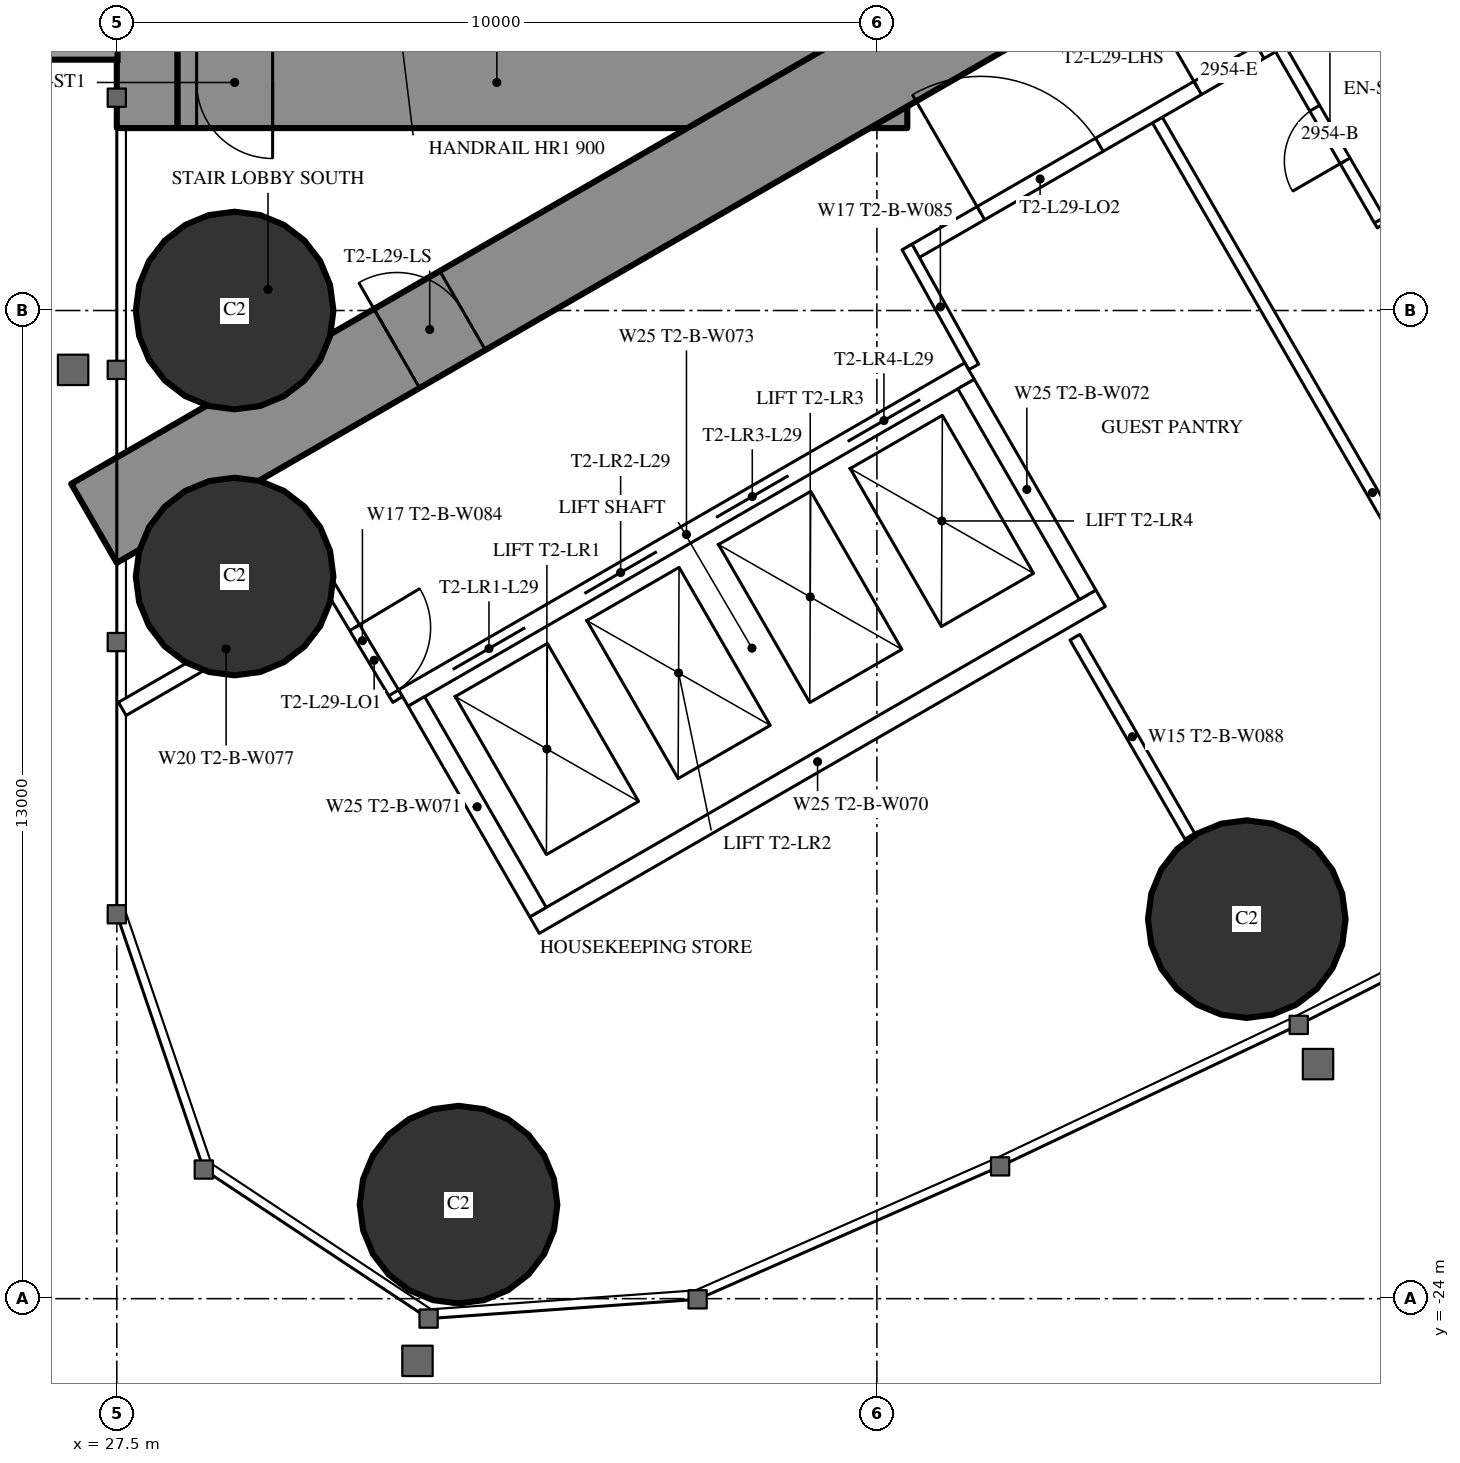
"""IFC4 building model, lengths in metres.
Left out: names, types, materials, properties, quantities, classifications, styles, units other than length and angle.
Written with IfcOpenShell. Run it as: python <this file> out.ifc"""

import sys

from ifc_helpers import new_model, si_unit, direction, frame, frame_2d, origin, origin_2d, place, context, subcontext, project, spatial, rectangle, hollow_circle, extrude, element, fill, save


model = new_model("IFC4")
c1 = context("Model", 3, precision=1e-05, world=origin(), true_north=direction((0.0, 1.0)))
c2 = subcontext(c1, "Body", "Model", "MODEL_VIEW")
j1 = project(units=[si_unit("LENGTHUNIT", "METRE"), si_unit("PLANEANGLEUNIT", "RADIAN")], contexts=[c1])
p1 = place(None, origin())
s1 = spatial("IfcSite", under=j1, at=p1, CompositionType="ELEMENT")
p2 = place(p1, origin())
s2 = spatial("IfcBuilding", under=s1, at=p2, CompositionType="ELEMENT")
p3 = place(p2, frame((0.0, 0.0, 111.6)))
s3 = spatial("IfcBuildingStorey", under=s2, at=p3, CompositionType="ELEMENT", Elevation=111.6)
for number, where, z_axis, x_axis in (
    (1, (31.996, -22.763, 0.0), (0.0, 0.0, 1.0), (1.0, 0.0, 0.0)),
    (2, (29.05, -11.0, 0.0), (0.0, 0.0, 1.0), (1.0, 0.0, 0.0)),
    (3, (29.05, -14.5, 0.0), (0.0, 0.0, 1.0), (1.0, 0.0, 0.0)),
    (4, (42.366, -19.007, 0.0), (0.0, 0.0, 1.0), (1.0, 0.0, 0.0)),
):
    element("IfcColumn", number, at=place(p3, frame(where, z_axis=z_axis, x_axis=x_axis)), inside=s3, PredefinedType="COLUMN", context=c2, shape_type="SweptSolid", body=[
        extrude(hollow_circle(Radius=1.3, WallThickness=0.1, at=origin_2d()), origin(), (0.0, 0.0, 1.0), 3.5),
    ])
p4 = place(p3, frame((27.9, -8.6, 0.0), z_axis=(0.0, 0.0, 1.0), x_axis=(0.0, 1.0, 0.0)))
e5 = element("IfcWall", 5, at=p4, inside=s3, PredefinedType="SHEAR", context=c2, shape_type="SweptSolid", body=[
    extrude(rectangle(XDim=17.2, YDim=0.8, at=frame_2d((8.6, 0.0))), origin(), (0.0, 0.0, 1.0), 3.5),
])
p5 = place(p4, frame((2.45, 0.0, 0.6)))
e6 = element("IfcOpeningElement", 6, at=p5, cuts=e5, PredefinedType="OPENING", context=c2, shape_type="SweptSolid", body=[
    extrude(rectangle(XDim=0.6, YDim=2.1, at=frame_2d((0.3, 1.05))), frame((0.0, 0.41, 0.0), z_axis=(0.0, -1.0, 0.0), x_axis=(1.0, 0.0, 0.0)), (0.0, 0.0, 1.0), 0.82),
])
p6 = place(p4, frame((14.15, 0.0, 0.6)))
e7 = element("IfcOpeningElement", 7, at=p6, cuts=e5, PredefinedType="OPENING", context=c2, shape_type="SweptSolid", body=[
    extrude(rectangle(XDim=0.6, YDim=2.1, at=frame_2d((0.3, 1.05))), frame((0.0, 0.41, 0.0), z_axis=(0.0, -1.0, 0.0), x_axis=(1.0, 0.0, 0.0)), (0.0, 0.0, 1.0), 0.82),
])
p7 = place(p3, frame((37.3, -8.6, 0.0), z_axis=(0.0, 0.0, 1.0), x_axis=(0.0, 1.0, 0.0)))
e8 = element("IfcWall", 8, at=p7, inside=s3, PredefinedType="SHEAR", context=c2, shape_type="SweptSolid", body=[
    extrude(rectangle(XDim=17.2, YDim=1.2, at=frame_2d((8.6, 0.0))), origin(), (0.0, 0.0, 1.0), 3.5),
])
p8 = place(p7, frame((7.7, 0.0, 0.0)))
e9 = element("IfcOpeningElement", 9, at=p8, cuts=e8, PredefinedType="OPENING", context=c2, shape_type="SweptSolid", body=[
    extrude(rectangle(XDim=1.8, YDim=2.2, at=frame_2d((0.9, 1.1))), frame((0.0, 0.61, 0.0), z_axis=(0.0, -1.0, 0.0), x_axis=(1.0, 0.0, 0.0)), (0.0, 0.0, 1.0), 1.22),
])
p9 = place(p3, frame((28.3, -8.0, 0.0), z_axis=(0.0, 0.0, 1.0), x_axis=(1.0, 0.0, 0.0)))
e10 = element("IfcWall", 10, at=p9, inside=s3, PredefinedType="SHEAR", context=c2, shape_type="SweptSolid", body=[
    extrude(rectangle(XDim=8.4, YDim=1.2, at=frame_2d((4.2, 0.0))), origin(), (0.0, 0.0, 1.0), 3.5),
])
p10 = place(p9, frame((0.25, 0.0, 0.0)))
e11 = element("IfcOpeningElement", 11, at=p10, cuts=e10, PredefinedType="OPENING", context=c2, shape_type="SweptSolid", body=[
    extrude(rectangle(XDim=1.0, YDim=2.2, at=frame_2d((0.5, 1.1))), frame((0.0, 0.61, 0.0), z_axis=(0.0, -1.0, 0.0), x_axis=(1.0, 0.0, 0.0)), (0.0, 0.0, 1.0), 1.22),
])
p11 = place(p3, frame((27.2, -13.8, 0.0), z_axis=(0.0, 0.0, 1.0), x_axis=(0.866027159892, 0.499996958321, 0.0)))
e12 = element("IfcWall", 12, at=p11, inside=s3, PredefinedType="SHEAR", context=c2, shape_type="SweptSolid", body=[
    extrude(rectangle(XDim=27.947, YDim=1.2, at=frame_2d((13.973, 0.0))), origin(), (0.0, 0.0, 1.0), 3.5),
])
p12 = place(p11, frame((4.6, 0.0, 0.0)))
e13 = element("IfcOpeningElement", 13, at=p12, cuts=e12, PredefinedType="OPENING", context=c2, shape_type="SweptSolid", body=[
    extrude(rectangle(XDim=1.0, YDim=2.2, at=frame_2d((0.5, 1.1))), frame((0.0, 0.61, 0.0), z_axis=(0.0, -1.0, 0.0), x_axis=(1.0, 0.0, 0.0)), (0.0, 0.0, 1.0), 1.22),
])
p13 = place(p11, frame((13.395, 0.0, 0.0)))
e14 = element("IfcOpeningElement", 14, at=p13, cuts=e12, PredefinedType="OPENING", context=c2, shape_type="SweptSolid", body=[
    extrude(rectangle(XDim=1.8, YDim=2.2, at=frame_2d((0.9, 1.1))), frame((0.0, 0.61, 0.0), z_axis=(0.0, -1.0, 0.0), x_axis=(1.0, 0.0, 0.0)), (0.0, 0.0, 1.0), 1.22),
])
p14 = place(p3, frame((41.19, -8.494, 0.0), z_axis=(0.0, 0.0, 1.0), x_axis=(0.49999258054, -0.866029687369, 0.0)))
e15 = element("IfcWall", 15, at=p14, inside=s3, PredefinedType="PARTITIONING", context=c2, shape_type="SweptSolid", body=[
    extrude(rectangle(XDim=11.318, YDim=0.15, at=frame_2d((5.659, 0.0))), origin(), (0.0, 0.0, 1.0), 3.25),
])
p15 = place(p3, frame((40.105, -15.299, 0.0), z_axis=(0.0, 0.0, 1.0), x_axis=(0.499978822259, -0.866037630414, 0.0)))
e16 = element("IfcWall", 16, at=p15, inside=s3, PredefinedType="PARTITIONING", context=c2, shape_type="SweptSolid", body=[
    extrude(rectangle(XDim=3.023, YDim=0.15, at=frame_2d((1.511, 0.0))), origin(), (0.0, 0.0, 1.0), 3.25),
])
p16 = place(p3, frame((27.572, -16.241, 0.0), z_axis=(0.0, 0.0, 1.0), x_axis=(0.866029654818, 0.499992636921, 0.0)))
e17 = element("IfcWall", 17, at=p16, inside=s3, PredefinedType="PARTITIONING", context=c2, shape_type="SweptSolid", body=[
    extrude(rectangle(XDim=3.155, YDim=0.2, at=frame_2d((1.577, 0.0))), origin(), (0.0, 0.0, 1.0), 3.25),
])
p17 = place(p3, frame((37.96, -10.243, 0.0), z_axis=(0.0, 0.0, 1.0), x_axis=(0.866026429433, 0.499998223521, 0.0)))
e18 = element("IfcWall", 18, at=p17, inside=s3, PredefinedType="PARTITIONING", context=c2, shape_type="SweptSolid", body=[
    extrude(rectangle(XDim=20.487, YDim=0.2, at=frame_2d((10.243, 0.0))), origin(), (0.0, 0.0, 1.0), 3.25),
])
p18 = place(p17, frame((4.343, 0.0, 0.0)))
e19 = element("IfcOpeningElement", 19, at=p18, cuts=e18, PredefinedType="OPENING", context=c2, shape_type="SweptSolid", body=[
    extrude(rectangle(XDim=0.95, YDim=2.2, at=frame_2d((0.475, 1.1))), frame((0.0, 0.11, 0.0), z_axis=(0.0, -1.0, 0.0), x_axis=(1.0, 0.0, 0.0)), (0.0, 0.0, 1.0), 0.22),
])
p19 = place(p17, frame((15.385, 0.0, 0.0)))
e20 = element("IfcOpeningElement", 20, at=p19, cuts=e18, PredefinedType="OPENING", context=c2, shape_type="SweptSolid", body=[
    extrude(rectangle(XDim=0.95, YDim=2.2, at=frame_2d((0.475, 1.1))), frame((0.0, 0.11, 0.0), z_axis=(0.0, -1.0, 0.0), x_axis=(1.0, 0.0, 0.0)), (0.0, 0.0, 1.0), 0.22),
])
p20 = place(p17, frame((17.085, 0.0, 0.0)))
e21 = element("IfcOpeningElement", 21, at=p20, cuts=e18, PredefinedType="OPENING", context=c2, shape_type="SweptSolid", body=[
    extrude(rectangle(XDim=0.95, YDim=2.2, at=frame_2d((0.475, 1.1))), frame((0.0, 0.11, 0.0), z_axis=(0.0, -1.0, 0.0), x_axis=(1.0, 0.0, 0.0)), (0.0, 0.0, 1.0), 0.22),
])
p21 = place(p17, frame((1.048, 0.0, 0.0)))
e22 = element("IfcOpeningElement", 22, at=p21, cuts=e18, PredefinedType="OPENING", context=c2, shape_type="SweptSolid", body=[
    extrude(rectangle(XDim=1.8, YDim=2.2, at=frame_2d((0.9, 1.1))), frame((0.0, 0.11, 0.0), z_axis=(0.0, -1.0, 0.0), x_axis=(1.0, 0.0, 0.0)), (0.0, 0.0, 1.0), 0.22),
])
p22 = place(p3, frame((30.267, -14.569, 0.0), z_axis=(0.0, 0.0, 1.0), x_axis=(0.514336634837, -0.857588377991, 0.0)))
e23 = element("IfcWall", 23, at=p22, inside=s3, PredefinedType="PARTITIONING", context=c2, shape_type="SweptSolid", body=[
    extrude(rectangle(XDim=1.805, YDim=0.15, at=frame_2d((0.903, 0.0))), origin(), (0.0, 0.0, 1.0), 3.25),
])
p23 = place(p22, frame((0.703, 0.0, 0.0)))
e24 = element("IfcOpeningElement", 24, at=p23, cuts=e23, PredefinedType="OPENING", context=c2, shape_type="SweptSolid", body=[
    extrude(rectangle(XDim=1.0, YDim=2.2, at=frame_2d((0.5, 1.1))), frame((0.0, 0.085, 0.0), z_axis=(0.0, -1.0, 0.0), x_axis=(1.0, 0.0, 0.0)), (0.0, 0.0, 1.0), 0.17),
])
p24 = place(p3, frame((38.773, -11.742, 0.0), z_axis=(0.0, 0.0, 1.0), x_axis=(-0.485528096672, 0.8742210632, 0.0)))
e25 = element("IfcWall", 25, at=p24, inside=s3, PredefinedType="PARTITIONING", context=c2, shape_type="SweptSolid", body=[
    extrude(rectangle(XDim=1.805, YDim=0.15, at=frame_2d((0.903, 0.0))), origin(), (0.0, 0.0, 1.0), 3.25),
])
p25 = place(p3, frame((44.045, -9.848, 0.0), z_axis=(0.0, 0.0, 1.0), x_axis=(0.866031185235, 0.4999899861, 0.0)))
e26 = element("IfcWall", 26, at=p25, inside=s3, PredefinedType="PARTITIONING", context=c2, shape_type="SweptSolid", body=[
    extrude(rectangle(XDim=2.475, YDim=0.15, at=frame_2d((1.238, 0.0))), origin(), (0.0, 0.0, 1.0), 3.25),
])
p26 = place(p3, frame((42.81, -7.559, 0.0), z_axis=(0.0, 0.0, 1.0), x_axis=(0.499936506574, -0.866062058628, 0.0)))
e27 = element("IfcWall", 27, at=p26, inside=s3, PredefinedType="PARTITIONING", context=c2, shape_type="SweptSolid", body=[
    extrude(rectangle(XDim=2.6, YDim=0.15, at=frame_2d((1.3, 0.0))), origin(), (0.0, 0.0, 1.0), 3.25),
])
p27 = place(p26, frame((0.9, 0.0, 0.0)))
e28 = element("IfcOpeningElement", 28, at=p27, cuts=e27, PredefinedType="OPENING", context=c2, shape_type="SweptSolid", body=[
    extrude(rectangle(XDim=0.8, YDim=2.2, at=frame_2d((0.4, 1.1))), frame((0.0, 0.085, 0.0), z_axis=(0.0, -1.0, 0.0), x_axis=(1.0, 0.0, 0.0)), (0.0, 0.0, 1.0), 0.17),
])
p28 = place(p3, frame((31.271, -16.097, 0.0), z_axis=(0.0, 0.0, 1.0), x_axis=(0.86604045752, 0.499973925258, 0.0)))
e29 = element("IfcWall", 29, at=p28, inside=s3, PredefinedType="PARTITIONING", context=c2, shape_type="SweptSolid", body=[
    extrude(rectangle(XDim=8.6, YDim=0.25, at=frame_2d((4.3, 0.0))), origin(), (0.0, 0.0, 1.0), 3.25),
])
p29 = place(p28, frame((0.75, 0.0, 0.0)))
e30 = element("IfcOpeningElement", 30, at=p29, cuts=e29, PredefinedType="OPENING", context=c2, shape_type="SweptSolid", body=[
    extrude(rectangle(XDim=1.1, YDim=2.2, at=frame_2d((0.55, 1.1))), frame((0.0, 0.135, 0.0), z_axis=(0.0, -1.0, 0.0), x_axis=(1.0, 0.0, 0.0)), (0.0, 0.0, 1.0), 0.27),
])
p30 = place(p28, frame((2.75, 0.0, 0.0)))
e31 = element("IfcOpeningElement", 31, at=p30, cuts=e29, PredefinedType="OPENING", context=c2, shape_type="SweptSolid", body=[
    extrude(rectangle(XDim=1.1, YDim=2.2, at=frame_2d((0.55, 1.1))), frame((0.0, 0.135, 0.0), z_axis=(0.0, -1.0, 0.0), x_axis=(1.0, 0.0, 0.0)), (0.0, 0.0, 1.0), 0.27),
])
p31 = place(p28, frame((4.75, 0.0, 0.0)))
e32 = element("IfcOpeningElement", 32, at=p31, cuts=e29, PredefinedType="OPENING", context=c2, shape_type="SweptSolid", body=[
    extrude(rectangle(XDim=1.1, YDim=2.2, at=frame_2d((0.55, 1.1))), frame((0.0, 0.135, 0.0), z_axis=(0.0, -1.0, 0.0), x_axis=(1.0, 0.0, 0.0)), (0.0, 0.0, 1.0), 0.27),
])
p32 = place(p28, frame((6.75, 0.0, 0.0)))
e33 = element("IfcOpeningElement", 33, at=p32, cuts=e29, PredefinedType="OPENING", context=c2, shape_type="SweptSolid", body=[
    extrude(rectangle(XDim=1.1, YDim=2.2, at=frame_2d((0.55, 1.1))), frame((0.0, 0.135, 0.0), z_axis=(0.0, -1.0, 0.0), x_axis=(1.0, 0.0, 0.0)), (0.0, 0.0, 1.0), 0.27),
])
p33 = place(p3, frame((32.996, -19.086, 0.0), z_axis=(0.0, 0.0, 1.0), x_axis=(0.866028165386, 0.499995216735, 0.0)))
e34 = element("IfcWall", 34, at=p33, inside=s3, PredefinedType="PARTITIONING", context=c2, shape_type="SweptSolid", body=[
    extrude(rectangle(XDim=8.6, YDim=0.25, at=frame_2d((4.3, 0.0))), origin(), (0.0, 0.0, 1.0), 3.25),
])
for number, where, z_axis, x_axis in (
    (35, (31.441, -16.143, 0.0), (0.0, 0.0, 1.0), (0.5, -0.866, 0.0)),
    (36, (38.673, -11.968, 0.0), (0.0, 0.0, 1.0), (0.5, -0.866, 0.0)),
):
    element("IfcWall", number, at=place(p3, frame(where, z_axis=z_axis, x_axis=x_axis)), inside=s3, PredefinedType="PARTITIONING", context=c2, shape_type="SweptSolid", body=[
        extrude(rectangle(XDim=3.201, YDim=0.25, at=frame_2d((1.6, 0.0))), origin(), (0.0, 0.0, 1.0), 3.25),
    ])
p34 = place(p27, origin())
e37 = element("IfcDoor", 37, at=p34, inside=s3, OperationType="SINGLE_SWING_RIGHT", PredefinedType="DOOR", context=c2, shape_type="SweptSolid", body=[
    extrude(rectangle(XDim=0.8, YDim=2.2, at=frame_2d((0.4, 1.1))), frame((0.0, 0.025, 0.0), z_axis=(0.0, -1.0, 0.0), x_axis=(1.0, 0.0, 0.0)), (0.0, 0.0, 1.0), 0.05),
])
fill(e28, e37)
p35 = place(p18, origin())
e38 = element("IfcDoor", 38, at=p35, inside=s3, OperationType="SINGLE_SWING_LEFT", PredefinedType="DOOR", context=c2, shape_type="SweptSolid", body=[
    extrude(rectangle(XDim=0.95, YDim=2.2, at=frame_2d((0.475, 1.1))), frame((0.0, 0.025, 0.0), z_axis=(0.0, -1.0, 0.0), x_axis=(1.0, 0.0, 0.0)), (0.0, 0.0, 1.0), 0.05),
])
fill(e19, e38)
p36 = place(p23, origin())
e39 = element("IfcDoor", 39, at=p36, inside=s3, OperationType="SINGLE_SWING_LEFT", PredefinedType="DOOR", context=c2, shape_type="SweptSolid", body=[
    extrude(rectangle(XDim=1.0, YDim=2.2, at=frame_2d((0.5, 1.1))), frame((0.0, 0.025, 0.0), z_axis=(0.0, -1.0, 0.0), x_axis=(1.0, 0.0, 0.0)), (0.0, 0.0, 1.0), 0.05),
])
fill(e24, e39)
p37 = place(p21, origin())
e40 = element("IfcDoor", 40, at=p37, inside=s3, OperationType="DOUBLE_DOOR_SINGLE_SWING", PredefinedType="DOOR", context=c2, shape_type="SweptSolid", body=[
    extrude(rectangle(XDim=1.8, YDim=2.2, at=frame_2d((0.9, 1.1))), frame((0.0, 0.025, 0.0), z_axis=(0.0, -1.0, 0.0), x_axis=(1.0, 0.0, 0.0)), (0.0, 0.0, 1.0), 0.05),
])
fill(e22, e40)
p38 = place(p12, origin())
e41 = element("IfcDoor", 41, at=p38, inside=s3, OperationType="SINGLE_SWING_LEFT", PredefinedType="DOOR", context=c2, shape_type="SweptSolid", body=[
    extrude(rectangle(XDim=1.0, YDim=2.2, at=frame_2d((0.5, 1.1))), frame((0.0, 0.025, 0.0), z_axis=(0.0, -1.0, 0.0), x_axis=(1.0, 0.0, 0.0)), (0.0, 0.0, 1.0), 0.05),
])
fill(e13, e41)
p39 = place(p10, origin())
e42 = element("IfcDoor", 42, at=p39, inside=s3, OperationType="SINGLE_SWING_RIGHT", PredefinedType="DOOR", context=c2, shape_type="SweptSolid", body=[
    extrude(rectangle(XDim=1.0, YDim=2.2, at=frame_2d((0.5, 1.1))), frame((0.0, 0.025, 0.0), z_axis=(0.0, -1.0, 0.0), x_axis=(1.0, 0.0, 0.0)), (0.0, 0.0, 1.0), 0.05),
])
fill(e11, e42)
p40 = place(p29, origin())
e43 = element("IfcDoor", 43, at=p40, inside=s3, OperationType="DOUBLE_DOOR_SLIDING", PredefinedType="USERDEFINED", context=c2, shape_type="SweptSolid", body=[
    extrude(rectangle(XDim=1.1, YDim=2.2, at=frame_2d((0.55, 1.1))), frame((0.0, 0.025, 0.0), z_axis=(0.0, -1.0, 0.0), x_axis=(1.0, 0.0, 0.0)), (0.0, 0.0, 1.0), 0.05),
])
fill(e30, e43)
p41 = place(p30, origin())
e44 = element("IfcDoor", 44, at=p41, inside=s3, OperationType="DOUBLE_DOOR_SLIDING", PredefinedType="USERDEFINED", context=c2, shape_type="SweptSolid", body=[
    extrude(rectangle(XDim=1.1, YDim=2.2, at=frame_2d((0.55, 1.1))), frame((0.0, 0.025, 0.0), z_axis=(0.0, -1.0, 0.0), x_axis=(1.0, 0.0, 0.0)), (0.0, 0.0, 1.0), 0.05),
])
fill(e31, e44)
p42 = place(p31, origin())
e45 = element("IfcDoor", 45, at=p42, inside=s3, OperationType="DOUBLE_DOOR_SLIDING", PredefinedType="USERDEFINED", context=c2, shape_type="SweptSolid", body=[
    extrude(rectangle(XDim=1.1, YDim=2.2, at=frame_2d((0.55, 1.1))), frame((0.0, 0.025, 0.0), z_axis=(0.0, -1.0, 0.0), x_axis=(1.0, 0.0, 0.0)), (0.0, 0.0, 1.0), 0.05),
])
fill(e32, e45)
p43 = place(p32, origin())
e46 = element("IfcDoor", 46, at=p43, inside=s3, OperationType="DOUBLE_DOOR_SLIDING", PredefinedType="USERDEFINED", context=c2, shape_type="SweptSolid", body=[
    extrude(rectangle(XDim=1.1, YDim=2.2, at=frame_2d((0.55, 1.1))), frame((0.0, 0.025, 0.0), z_axis=(0.0, -1.0, 0.0), x_axis=(1.0, 0.0, 0.0)), (0.0, 0.0, 1.0), 0.05),
])
fill(e33, e46)
save(model, sys.argv[1])
